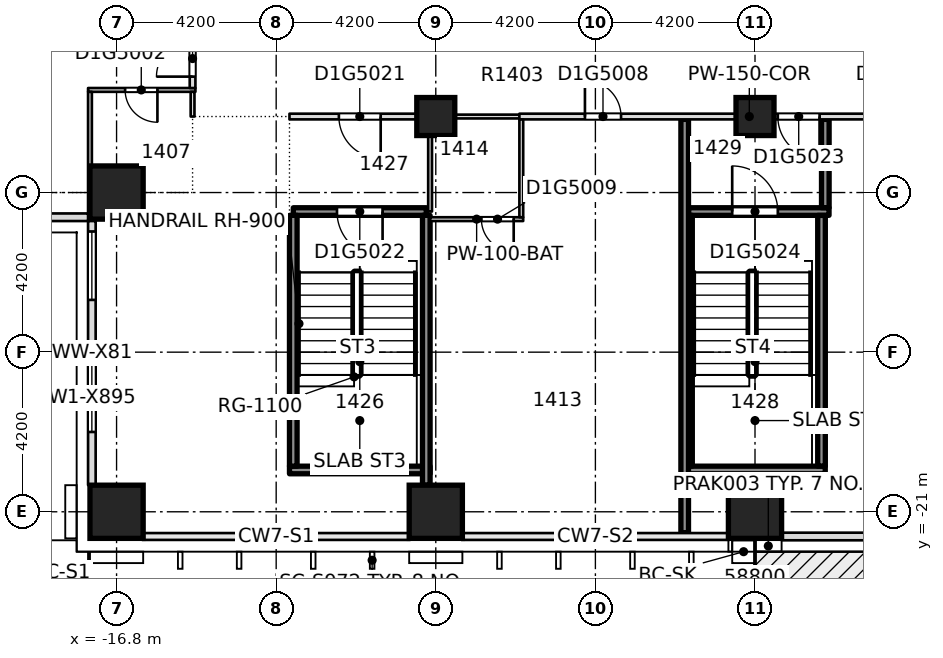
"""IFC4 building model, lengths in metres.
Left out: names, types, materials, properties, quantities, classifications, styles, units other than length and angle.
Written with IfcOpenShell. Run it as: python <this file> out.ifc"""

import sys

from ifc_helpers import new_model, si_unit, direction, frame, frame_2d, origin, origin_2d, place, context, subcontext, project, spatial, rectangle, extrude, element, fill, save


model = new_model("IFC4")
c1 = context("Model", 3, precision=1e-05, world=origin(), true_north=direction((0.0, 1.0)))
c2 = subcontext(c1, "Body", "Model", "MODEL_VIEW")
j1 = project(units=[si_unit("LENGTHUNIT", "METRE"), si_unit("PLANEANGLEUNIT", "RADIAN")], contexts=[c1])
p1 = place(None, origin())
s1 = spatial("IfcSite", under=j1, at=p1, CompositionType="ELEMENT")
p2 = place(p1, origin())
s2 = spatial("IfcBuilding", under=s1, at=p2, CompositionType="ELEMENT")
p3 = place(p2, frame((0.0, 0.0, 62.1)))
s3 = spatial("IfcBuildingStorey", under=s2, at=p3, CompositionType="ELEMENT", Elevation=62.1)
for number, where, z_axis, x_axis in (
    (1, (-16.8, -21.0, -0.32), (0.0, 0.0, 1.0), (1.0, 0.0, 0.0)),
    (2, (-8.4, -21.0, -0.32), (0.0, 0.0, 1.0), (1.0, 0.0, 0.0)),
    (3, (0.0, -21.0, -0.32), (0.0, 0.0, 1.0), (1.0, 0.0, 0.0)),
    (4, (-16.8, -12.6, -0.32), (0.0, 0.0, 1.0), (1.0, 0.0, 0.0)),
):
    element("IfcColumn", number, at=place(p3, frame(where, z_axis=z_axis, x_axis=x_axis)), inside=s3, PredefinedType="COLUMN", context=c2, shape_type="SweptSolid", body=[
        extrude(rectangle(XDim=1.4, YDim=1.4, at=origin_2d()), origin(), (0.0, 0.0, 1.0), 3.45),
    ])
for number, where, z_axis, x_axis in (
    (5, (-8.4, -10.6, -0.32), (0.0, 0.0, 1.0), (1.0, 0.0, 0.0)),
    (6, (0.0, -10.6, -0.32), (0.0, 0.0, 1.0), (1.0, 0.0, 0.0)),
):
    element("IfcColumn", number, at=place(p3, frame(where, z_axis=z_axis, x_axis=x_axis)), inside=s3, PredefinedType="COLUMN", context=c2, shape_type="SweptSolid", body=[
        extrude(rectangle(XDim=1.0, YDim=1.0, at=origin_2d()), origin(), (0.0, 0.0, 1.0), 3.45),
    ])
p4 = place(p3, frame((-1.848, -19.9, 0.0), z_axis=(0.0, 0.0, 1.0), x_axis=(1.0, 0.0, 0.0)))
e7 = element("IfcWall", 7, at=p4, inside=s3, PredefinedType="SOLIDWALL", context=c2, shape_type="SweptSolid", body=[
    extrude(rectangle(XDim=3.696, YDim=0.2, at=frame_2d((1.848, 0.0))), origin(), (0.0, 0.0, 1.0), 3.13),
])
p5 = place(p3, frame((-8.55, -13.3, 0.0), z_axis=(0.0, 0.0, 1.0), x_axis=(1.0, 0.0, 0.0)))
e8 = element("IfcWall", 8, at=p5, inside=s3, PredefinedType="PARTITIONING", context=c2, shape_type="SweptSolid", body=[
    extrude(rectangle(XDim=2.45, YDim=0.1, at=frame_2d((1.225, 0.0))), origin(), (0.0, 0.0, 1.0), 3.13),
])
p6 = place(p5, frame((1.35, 0.0, 0.0)))
e9 = element("IfcOpeningElement", 9, at=p6, cuts=e8, PredefinedType="OPENING", context=c2, shape_type="SweptSolid", body=[
    extrude(rectangle(XDim=0.85, YDim=2.1, at=frame_2d((0.425, 1.05))), frame((0.0, 0.06, 0.0), z_axis=(0.0, -1.0, 0.0), x_axis=(1.0, 0.0, 0.0)), (0.0, 0.0, 1.0), 0.12),
])
p7 = place(p3, frame((-12.15, -13.1, 0.0), z_axis=(0.0, 0.0, 1.0), x_axis=(1.0, 0.0, 0.0)))
e10 = element("IfcWall", 10, at=p7, inside=s3, PredefinedType="SOLIDWALL", context=c2, shape_type="SweptSolid", body=[
    extrude(rectangle(XDim=3.5, YDim=0.2, at=frame_2d((1.75, 0.0))), origin(), (0.0, 0.0, 1.0), 3.13),
])
p8 = place(p7, frame((1.15, 0.0, 0.0)))
e11 = element("IfcOpeningElement", 11, at=p8, cuts=e10, PredefinedType="OPENING", context=c2, shape_type="SweptSolid", body=[
    extrude(rectangle(XDim=1.2, YDim=2.1, at=frame_2d((0.6, 1.05))), frame((0.0, 0.11, 0.0), z_axis=(0.0, -1.0, 0.0), x_axis=(1.0, 0.0, 0.0)), (0.0, 0.0, 1.0), 0.22),
])
p9 = place(p3, frame((-1.748, -13.1, 0.0), z_axis=(0.0, 0.0, 1.0), x_axis=(1.0, 0.0, 0.0)))
e12 = element("IfcWall", 12, at=p9, inside=s3, PredefinedType="SOLIDWALL", context=c2, shape_type="SweptSolid", body=[
    extrude(rectangle(XDim=3.696, YDim=0.2, at=frame_2d((1.848, 0.0))), origin(), (0.0, 0.0, 1.0), 3.13),
])
p10 = place(p9, frame((1.148, 0.0, 0.0)))
e13 = element("IfcOpeningElement", 13, at=p10, cuts=e12, PredefinedType="OPENING", context=c2, shape_type="SweptSolid", body=[
    extrude(rectangle(XDim=1.2, YDim=2.1, at=frame_2d((0.6, 1.05))), frame((0.0, 0.11, 0.0), z_axis=(0.0, -1.0, 0.0), x_axis=(1.0, 0.0, 0.0)), (0.0, 0.0, 1.0), 0.22),
])
p11 = place(p3, frame((-12.25, -10.6, 0.0), z_axis=(0.0, 0.0, 1.0), x_axis=(1.0, 0.0, 0.0)))
e14 = element("IfcWall", 14, at=p11, inside=s3, PredefinedType="PARTITIONING", context=c2, shape_type="SweptSolid", body=[
    extrude(rectangle(XDim=3.75, YDim=0.15, at=frame_2d((1.875, 0.0))), origin(), (0.0, 0.0, 1.0), 3.13),
])
p12 = place(p11, frame((1.3, 0.0, 0.0)))
e15 = element("IfcOpeningElement", 15, at=p12, cuts=e14, PredefinedType="OPENING", context=c2, shape_type="SweptSolid", body=[
    extrude(rectangle(XDim=1.1, YDim=2.1, at=frame_2d((0.55, 1.05))), frame((0.0, 0.085, 0.0), z_axis=(0.0, -1.0, 0.0), x_axis=(1.0, 0.0, 0.0)), (0.0, 0.0, 1.0), 0.17),
])
p13 = place(p3, frame((-8.6, -10.6, 0.0), z_axis=(0.0, 0.0, 1.0), x_axis=(1.0, 0.0, 0.0)))
e16 = element("IfcWall", 16, at=p13, inside=s3, PredefinedType="PARTITIONING", context=c2, shape_type="SweptSolid", body=[
    extrude(rectangle(XDim=2.5, YDim=0.1, at=frame_2d((1.25, 0.0))), origin(), (0.0, 0.0, 1.0), 3.13),
])
p14 = place(p3, frame((-6.2, -10.6, 0.0), z_axis=(0.0, 0.0, 1.0), x_axis=(1.0, 0.0, 0.0)))
e17 = element("IfcWall", 17, at=p14, inside=s3, PredefinedType="PARTITIONING", context=c2, shape_type="SweptSolid", body=[
    extrude(rectangle(XDim=12.1, YDim=0.15, at=frame_2d((6.05, 0.0))), origin(), (0.0, 0.0, 1.0), 3.13),
])
p15 = place(p14, frame((1.725, 0.0, 0.0)))
e18 = element("IfcOpeningElement", 18, at=p15, cuts=e17, PredefinedType="OPENING", context=c2, shape_type="SweptSolid", body=[
    extrude(rectangle(XDim=0.95, YDim=2.1, at=frame_2d((0.475, 1.05))), frame((0.0, 0.085, 0.0), z_axis=(0.0, -1.0, 0.0), x_axis=(1.0, 0.0, 0.0)), (0.0, 0.0, 1.0), 0.17),
])
p16 = place(p14, frame((9.575, 0.0, 0.0)))
e19 = element("IfcOpeningElement", 19, at=p16, cuts=e17, PredefinedType="OPENING", context=c2, shape_type="SweptSolid", body=[
    extrude(rectangle(XDim=0.95, YDim=2.1, at=frame_2d((0.475, 1.05))), frame((0.0, 0.085, 0.0), z_axis=(0.0, -1.0, 0.0), x_axis=(1.0, 0.0, 0.0)), (0.0, 0.0, 1.0), 0.17),
])
p17 = place(p14, frame((6.8, 0.0, 0.0)))
e20 = element("IfcOpeningElement", 20, at=p17, cuts=e17, PredefinedType="OPENING", context=c2, shape_type="SweptSolid", body=[
    extrude(rectangle(XDim=1.1, YDim=2.1, at=frame_2d((0.55, 1.05))), frame((0.0, 0.085, 0.0), z_axis=(0.0, -1.0, 0.0), x_axis=(1.0, 0.0, 0.0)), (0.0, 0.0, 1.0), 0.17),
])
p18 = place(p3, frame((-17.55, -9.9, 0.0), z_axis=(0.0, 0.0, 1.0), x_axis=(1.0, 0.0, 0.0)))
e21 = element("IfcWall", 21, at=p18, inside=s3, PredefinedType="PARTITIONING", context=c2, shape_type="SweptSolid", body=[
    extrude(rectangle(XDim=2.825, YDim=0.1, at=frame_2d((1.413, 0.0))), origin(), (0.0, 0.0, 1.0), 3.13),
])
p19 = place(p18, frame((0.975, 0.0, 0.0)))
e22 = element("IfcOpeningElement", 22, at=p19, cuts=e21, PredefinedType="OPENING", context=c2, shape_type="SweptSolid", body=[
    extrude(rectangle(XDim=0.85, YDim=2.1, at=frame_2d((0.425, 1.05))), frame((0.0, 0.06, 0.0), z_axis=(0.0, -1.0, 0.0), x_axis=(1.0, 0.0, 0.0)), (0.0, 0.0, 1.0), 0.12),
])
p20 = place(p3, frame((-17.5, -13.35, 0.0), z_axis=(0.0, 0.0, 1.0), x_axis=(0.0, 1.0, 0.0)))
e23 = element("IfcWall", 23, at=p20, inside=s3, PredefinedType="PARTITIONING", context=c2, shape_type="SweptSolid", body=[
    extrude(rectangle(XDim=3.4, YDim=0.1, at=frame_2d((1.7, 0.0))), origin(), (0.0, 0.0, 1.0), 3.13),
])
p21 = place(p3, frame((-14.8, -10.6, 0.0), z_axis=(0.0, 0.0, 1.0), x_axis=(0.0, 1.0, 0.0)))
e24 = element("IfcWall", 24, at=p21, inside=s3, PredefinedType="PARTITIONING", context=c2, shape_type="SweptSolid", body=[
    extrude(rectangle(XDim=0.65, YDim=0.1, at=frame_2d((0.325, 0.0))), origin(), (0.0, 0.0, 1.0), 3.13),
])
p22 = place(p3, frame((-14.8, -9.85, 0.0), z_axis=(0.0, 0.0, 1.0), x_axis=(0.0, 1.0, 0.0)))
e25 = element("IfcWall", 25, at=p22, inside=s3, PredefinedType="PARTITIONING", context=c2, shape_type="SweptSolid", body=[
    extrude(rectangle(XDim=18.175, YDim=0.15, at=frame_2d((9.087, 0.0))), origin(), (0.0, 0.0, 1.0), 3.13),
])
p23 = place(p22, frame((0.3, 0.0, 0.0)))
e26 = element("IfcOpeningElement", 26, at=p23, cuts=e25, PredefinedType="OPENING", context=c2, shape_type="SweptSolid", body=[
    extrude(rectangle(XDim=0.95, YDim=2.1, at=frame_2d((0.475, 1.05))), frame((0.0, 0.085, 0.0), z_axis=(0.0, -1.0, 0.0), x_axis=(1.0, 0.0, 0.0)), (0.0, 0.0, 1.0), 0.17),
])
p24 = place(p22, frame((9.3, 0.0, 0.0)))
e27 = element("IfcOpeningElement", 27, at=p24, cuts=e25, PredefinedType="OPENING", context=c2, shape_type="SweptSolid", body=[
    extrude(rectangle(XDim=1.1, YDim=2.1, at=frame_2d((0.55, 1.05))), frame((0.0, 0.085, 0.0), z_axis=(0.0, -1.0, 0.0), x_axis=(1.0, 0.0, 0.0)), (0.0, 0.0, 1.0), 0.17),
])
p25 = place(p22, frame((4.05, 0.0, 0.0)))
e28 = element("IfcOpeningElement", 28, at=p25, cuts=e25, PredefinedType="OPENING", context=c2, shape_type="SweptSolid", body=[
    extrude(rectangle(XDim=1.0, YDim=2.1, at=frame_2d((0.5, 1.05))), frame((0.0, 0.085, 0.0), z_axis=(0.0, -1.0, 0.0), x_axis=(1.0, 0.0, 0.0)), (0.0, 0.0, 1.0), 0.17),
])
p26 = place(p3, frame((-8.55, -13.1, 0.0), z_axis=(0.0, 0.0, 1.0), x_axis=(0.0, 1.0, 0.0)))
e29 = element("IfcWall", 29, at=p26, inside=s3, PredefinedType="PARTITIONING", context=c2, shape_type="SweptSolid", body=[
    extrude(rectangle(XDim=2.425, YDim=0.1, at=frame_2d((1.212, 0.0))), origin(), (0.0, 0.0, 1.0), 3.13),
])
p27 = place(p3, frame((-6.15, -13.25, 0.0), z_axis=(0.0, 0.0, 1.0), x_axis=(0.0, 1.0, 0.0)))
e30 = element("IfcWall", 30, at=p27, inside=s3, PredefinedType="PARTITIONING", context=c2, shape_type="SweptSolid", body=[
    extrude(rectangle(XDim=2.575, YDim=0.1, at=frame_2d((1.288, 0.0))), origin(), (0.0, 0.0, 1.0), 3.13),
])
for number, where, z_axis, x_axis in (
    (31, (-1.75, -19.798, 0.0), (0.0, 0.0, 1.0), (0.0, 1.0, 0.0)),
    (32, (1.75, -19.798, 0.0), (0.0, 0.0, 1.0), (0.0, 1.0, 0.0)),
):
    element("IfcWall", number, at=place(p3, frame(where, z_axis=z_axis, x_axis=x_axis)), inside=s3, PredefinedType="SOLIDWALL", context=c2, shape_type="SweptSolid", body=[
        extrude(rectangle(XDim=6.596, YDim=0.2, at=frame_2d((3.298, 0.0))), origin(), (0.0, 0.0, 1.0), 3.13),
    ])
p28 = place(p3, frame((1.85, -12.998, 0.0), z_axis=(0.0, 0.0, 1.0), x_axis=(0.0, 1.0, 0.0)))
e33 = element("IfcWall", 33, at=p28, inside=s3, PredefinedType="SOLIDWALL", context=c2, shape_type="SweptSolid", body=[
    extrude(rectangle(XDim=2.323, YDim=0.2, at=frame_2d((1.162, 0.0))), origin(), (0.0, 0.0, 1.0), 3.13),
])
p29 = place(p3, frame((0.7, -21.65, 0.0), z_axis=(0.0, 0.0, 1.0), x_axis=(1.0, 0.0, 0.0)))
e34 = element("IfcWall", 34, at=p29, inside=s3, PredefinedType="STANDARD", context=c2, shape_type="SweptSolid", body=[
    extrude(rectangle(XDim=7.0, YDim=0.2, at=frame_2d((3.5, 0.0))), origin(), (0.0, 0.0, 1.0), 3.13),
])
p30 = place(p29, frame((3.8, 0.0, 0.2)))
e35 = element("IfcOpeningElement", 35, at=p30, cuts=e34, PredefinedType="OPENING", context=c2, shape_type="SweptSolid", body=[
    extrude(rectangle(XDim=1.8, YDim=2.65, at=frame_2d((0.9, 1.325))), frame((0.0, 0.11, 0.0), z_axis=(0.0, -1.0, 0.0), x_axis=(1.0, 0.0, 0.0)), (0.0, 0.0, 1.0), 0.22),
])
p31 = place(p29, frame((5.7, 0.0, 0.0)))
e36 = element("IfcOpeningElement", 36, at=p31, cuts=e34, PredefinedType="OPENING", context=c2, shape_type="SweptSolid", body=[
    extrude(rectangle(XDim=1.0, YDim=2.4, at=frame_2d((0.5, 1.2))), frame((0.0, 0.11, 0.0), z_axis=(0.0, -1.0, 0.0), x_axis=(1.0, 0.0, 0.0)), (0.0, 0.0, 1.0), 0.22),
])
p32 = place(p3, frame((-24.5, -13.25, 0.0), z_axis=(0.0, 0.0, 1.0), x_axis=(1.0, 0.0, 0.0)))
e37 = element("IfcWall", 37, at=p32, inside=s3, PredefinedType="STANDARD", context=c2, shape_type="SweptSolid", body=[
    extrude(rectangle(XDim=6.95, YDim=0.2, at=frame_2d((3.475, 0.0))), origin(), (0.0, 0.0, 1.0), 3.13),
])
p33 = place(p3, frame((-17.45, -13.35, 0.0), z_axis=(0.0, 0.0, 1.0), x_axis=(0.0, -1.0, 0.0)))
e38 = element("IfcWall", 38, at=p33, inside=s3, PredefinedType="STANDARD", context=c2, shape_type="SweptSolid", body=[
    extrude(rectangle(XDim=6.95, YDim=0.2, at=frame_2d((3.475, 0.0))), origin(), (0.0, 0.0, 1.0), 3.13),
])
p34 = place(p33, frame((3.75, 0.0, 0.2)))
e39 = element("IfcOpeningElement", 39, at=p34, cuts=e38, PredefinedType="OPENING", context=c2, shape_type="SweptSolid", body=[
    extrude(rectangle(XDim=1.8, YDim=2.65, at=frame_2d((0.9, 1.325))), frame((0.0, 0.11, 0.0), z_axis=(0.0, -1.0, 0.0), x_axis=(1.0, 0.0, 0.0)), (0.0, 0.0, 1.0), 0.22),
])
p35 = place(p33, frame((0.275, 0.0, 0.2)))
e40 = element("IfcOpeningElement", 40, at=p35, cuts=e38, PredefinedType="OPENING", context=c2, shape_type="SweptSolid", body=[
    extrude(rectangle(XDim=1.8, YDim=2.65, at=frame_2d((0.9, 1.325))), frame((0.0, 0.11, 0.0), z_axis=(0.0, -1.0, 0.0), x_axis=(1.0, 0.0, 0.0)), (0.0, 0.0, 1.0), 0.22),
])
p36 = place(p3, frame((-12.25, -19.9, 0.0), z_axis=(0.0, 0.0, 1.0), x_axis=(1.0, 0.0, 0.0)))
e41 = element("IfcWall", 41, at=p36, inside=s3, PredefinedType="SOLIDWALL", context=c2, shape_type="SweptSolid", body=[
    extrude(rectangle(XDim=3.7, YDim=0.2, at=frame_2d((1.85, 0.0))), origin(), (0.0, 0.0, 1.0), 3.13),
])
p37 = place(p3, frame((-12.15, -19.8, 0.0), z_axis=(0.0, 0.0, 1.0), x_axis=(0.0, 1.0, 0.0)))
e42 = element("IfcWall", 42, at=p37, inside=s3, PredefinedType="SOLIDWALL", context=c2, shape_type="SweptSolid", body=[
    extrude(rectangle(XDim=6.6, YDim=0.2, at=frame_2d((3.3, 0.0))), origin(), (0.0, 0.0, 1.0), 3.13),
])
p38 = place(p3, frame((-8.65, -20.3, 0.0), z_axis=(0.0, 0.0, 1.0), x_axis=(0.0, 1.0, 0.0)))
e43 = element("IfcWall", 43, at=p38, inside=s3, PredefinedType="SOLIDWALL", context=c2, shape_type="SweptSolid", body=[
    extrude(rectangle(XDim=7.1, YDim=0.2, at=frame_2d((3.55, 0.0))), origin(), (0.0, 0.0, 1.0), 3.13),
])
p39 = place(p3, frame((-1.85, -21.55, 0.0), z_axis=(0.0, 0.0, 1.0), x_axis=(0.0, 1.0, 0.0)))
e44 = element("IfcWall", 44, at=p39, inside=s3, PredefinedType="SOLIDWALL", context=c2, shape_type="SweptSolid", body=[
    extrude(rectangle(XDim=10.875, YDim=0.2, at=frame_2d((5.438, 0.0))), origin(), (0.0, 0.0, 1.0), 3.13),
])
p40 = place(p23, origin())
e45 = element("IfcDoor", 45, at=p40, inside=s3, OperationType="SINGLE_SWING_LEFT", PredefinedType="DOOR", context=c2, shape_type="SweptSolid", body=[
    extrude(rectangle(XDim=0.95, YDim=2.1, at=frame_2d((0.475, 1.05))), frame((0.0, 0.025, 0.0), z_axis=(0.0, -1.0, 0.0), x_axis=(1.0, 0.0, 0.0)), (0.0, 0.0, 1.0), 0.05),
])
fill(e26, e45)
p41 = place(p19, origin())
e46 = element("IfcDoor", 46, at=p41, inside=s3, OperationType="SINGLE_SWING_RIGHT", PredefinedType="DOOR", context=c2, shape_type="SweptSolid", body=[
    extrude(rectangle(XDim=0.85, YDim=2.1, at=frame_2d((0.425, 1.05))), frame((0.0, 0.025, 0.0), z_axis=(0.0, -1.0, 0.0), x_axis=(1.0, 0.0, 0.0)), (0.0, 0.0, 1.0), 0.05),
])
fill(e22, e46)
p42 = place(p15, origin())
e47 = element("IfcDoor", 47, at=p42, inside=s3, OperationType="SINGLE_SWING_LEFT", PredefinedType="DOOR", context=c2, shape_type="SweptSolid", body=[
    extrude(rectangle(XDim=0.95, YDim=2.1, at=frame_2d((0.475, 1.05))), frame((0.0, 0.025, 0.0), z_axis=(0.0, -1.0, 0.0), x_axis=(1.0, 0.0, 0.0)), (0.0, 0.0, 1.0), 0.05),
])
fill(e18, e47)
p43 = place(p6, origin())
e48 = element("IfcDoor", 48, at=p43, inside=s3, OperationType="SINGLE_SWING_LEFT", PredefinedType="DOOR", context=c2, shape_type="SweptSolid", body=[
    extrude(rectangle(XDim=0.85, YDim=2.1, at=frame_2d((0.425, 1.05))), frame((0.0, 0.025, 0.0), z_axis=(0.0, -1.0, 0.0), x_axis=(1.0, 0.0, 0.0)), (0.0, 0.0, 1.0), 0.05),
])
fill(e9, e48)
p44 = place(p12, origin())
e49 = element("IfcDoor", 49, at=p44, inside=s3, OperationType="SINGLE_SWING_RIGHT", PredefinedType="DOOR", context=c2, shape_type="SweptSolid", body=[
    extrude(rectangle(XDim=1.1, YDim=2.1, at=frame_2d((0.55, 1.05))), frame((0.0, 0.025, 0.0), z_axis=(0.0, -1.0, 0.0), x_axis=(1.0, 0.0, 0.0)), (0.0, 0.0, 1.0), 0.05),
])
fill(e15, e49)
p45 = place(p8, origin())
e50 = element("IfcDoor", 50, at=p45, inside=s3, OperationType="SINGLE_SWING_RIGHT", PredefinedType="DOOR", context=c2, shape_type="SweptSolid", body=[
    extrude(rectangle(XDim=1.2, YDim=2.1, at=frame_2d((0.6, 1.05))), frame((0.0, 0.025, 0.0), z_axis=(0.0, -1.0, 0.0), x_axis=(1.0, 0.0, 0.0)), (0.0, 0.0, 1.0), 0.05),
])
fill(e11, e50)
p46 = place(p17, origin())
e51 = element("IfcDoor", 51, at=p46, inside=s3, OperationType="SINGLE_SWING_RIGHT", PredefinedType="DOOR", context=c2, shape_type="SweptSolid", body=[
    extrude(rectangle(XDim=1.1, YDim=2.1, at=frame_2d((0.55, 1.05))), frame((0.0, 0.025, 0.0), z_axis=(0.0, -1.0, 0.0), x_axis=(1.0, 0.0, 0.0)), (0.0, 0.0, 1.0), 0.05),
])
fill(e20, e51)
p47 = place(p10, origin())
e52 = element("IfcDoor", 52, at=p47, inside=s3, OperationType="SINGLE_SWING_RIGHT", PredefinedType="DOOR", context=c2, shape_type="SweptSolid", body=[
    extrude(rectangle(XDim=1.2, YDim=2.1, at=frame_2d((0.6, 1.05))), frame((0.0, 0.025, 0.0), z_axis=(0.0, -1.0, 0.0), x_axis=(1.0, 0.0, 0.0)), (0.0, 0.0, 1.0), 0.05),
])
fill(e13, e52)
p48 = place(p34, origin())
e53 = element("IfcWindow", 53, at=p48, inside=s3, PartitioningType="SINGLE_PANEL", PredefinedType="WINDOW", context=c2, shape_type="SweptSolid", body=[
    extrude(rectangle(XDim=1.8, YDim=2.65, at=frame_2d((0.9, 1.325))), frame((0.0, 0.03, 0.0), z_axis=(0.0, -1.0, 0.0), x_axis=(1.0, 0.0, 0.0)), (0.0, 0.0, 1.0), 0.06),
])
fill(e39, e53)
p49 = place(p35, origin())
e54 = element("IfcWindow", 54, at=p49, inside=s3, PartitioningType="SINGLE_PANEL", PredefinedType="WINDOW", context=c2, shape_type="SweptSolid", body=[
    extrude(rectangle(XDim=1.8, YDim=2.65, at=frame_2d((0.9, 1.325))), frame((0.0, 0.03, 0.0), z_axis=(0.0, -1.0, 0.0), x_axis=(1.0, 0.0, 0.0)), (0.0, 0.0, 1.0), 0.06),
])
fill(e40, e54)
save(model, sys.argv[1])
